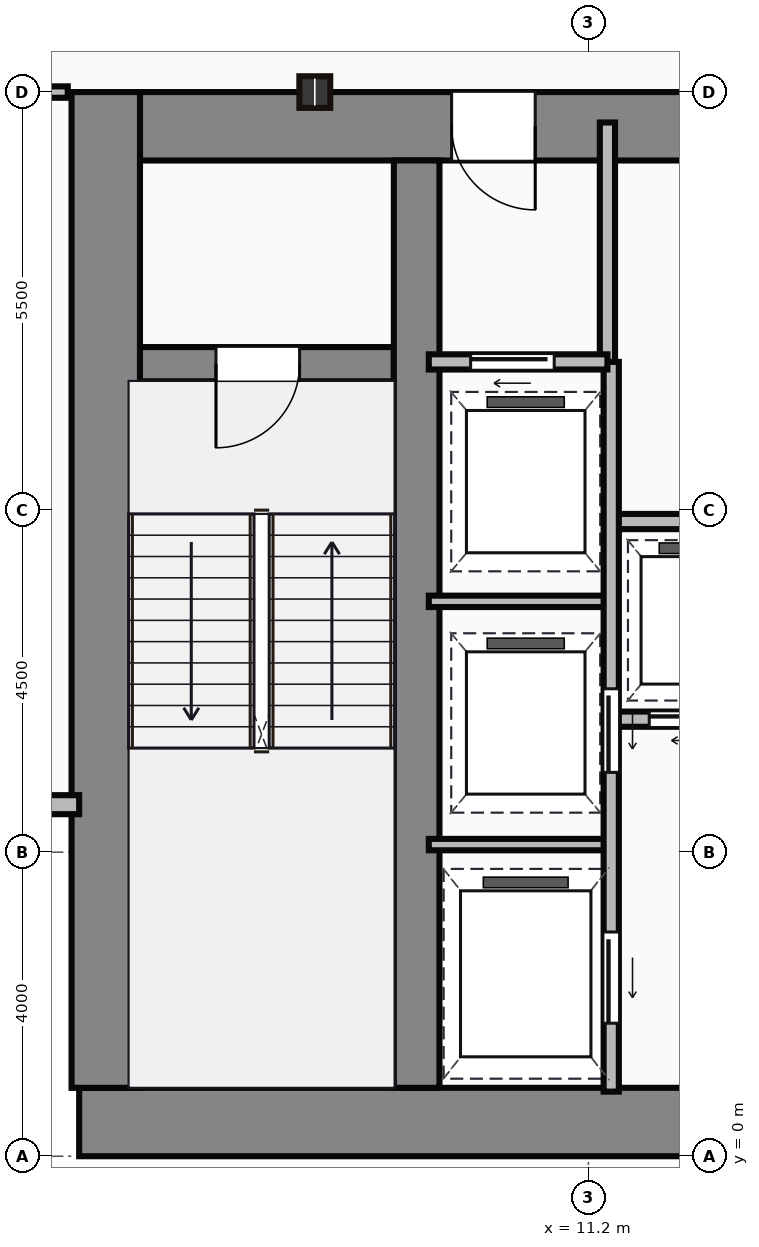
"""IFC4 building model, lengths in metres.
Left out: names, types, materials, properties, quantities, classifications, styles, units other than length and angle.
Written with IfcOpenShell. Run it as: python <this file> out.ifc"""

import sys

from ifc_helpers import new_model, si_unit, direction, frame, frame_2d, origin, origin_2d, place, context, subcontext, project, spatial, rectangle, i_section, extrude, source, transform, mapped, element, fill, save


model = new_model("IFC4")
c1 = context("Model", 3, precision=1e-05, world=origin(), true_north=direction((0.0, 1.0)))
c2 = subcontext(c1, "Body", "Model", "MODEL_VIEW")
j1 = project(units=[si_unit("LENGTHUNIT", "METRE"), si_unit("PLANEANGLEUNIT", "RADIAN")], contexts=[c1])
p1 = place(None, origin())
s1 = spatial("IfcSite", under=j1, at=p1, CompositionType="ELEMENT")
p2 = place(p1, origin())
s2 = spatial("IfcBuilding", under=s1, at=p2, CompositionType="ELEMENT")
p3 = place(p2, frame((0.0, 0.0, 79.95)))
s3 = spatial("IfcBuildingStorey", under=s2, at=p3, CompositionType="ELEMENT", Elevation=79.95)
m1 = source(origin(), c2, "Body", "SweptSolid", [
    extrude(rectangle(XDim=29.5, YDim=0.9, at=frame_2d((14.75, 0.0))), origin(), (0.0, 0.0, 1.0), 4.2),
])
p4 = place(p3, frame((4.5, 0.45, 0.0), z_axis=(0.0, 0.0, 1.0), x_axis=(1.0, 0.0, 0.0)))
e1 = element("IfcWall", 1, at=p4, inside=s3, PredefinedType="SHEAR", context=c2, shape_type="MappedRepresentation", body=[
    mapped(m1, transform((0.0, 0.0, 0.0))),
])
m2 = source(origin(), c2, "Body", "SweptSolid", [
    extrude(rectangle(XDim=13.1, YDim=0.9, at=frame_2d((6.55, 0.0))), origin(), (0.0, 0.0, 1.0), 4.2),
])
p5 = place(p3, frame((4.85, 0.9, 0.0), z_axis=(0.0, 0.0, 1.0), x_axis=(0.0, 1.0, 0.0)))
e2 = element("IfcWall", 2, at=p5, inside=s3, PredefinedType="SHEAR", context=c2, shape_type="MappedRepresentation", body=[
    mapped(m2, transform((0.0, 0.0, 0.0))),
])
m3 = source(origin(), c2, "Body", "SweptSolid", [
    extrude(rectangle(XDim=9.1, YDim=0.9, at=frame_2d((4.55, 0.0))), origin(), (0.0, 0.0, 1.0), 4.2),
])
p6 = place(p3, frame((5.3, 13.55, 0.0), z_axis=(0.0, 0.0, 1.0), x_axis=(1.0, 0.0, 0.0)))
e3 = element("IfcWall", 3, at=p6, inside=s3, PredefinedType="SHEAR", context=c2, shape_type="MappedRepresentation", body=[
    mapped(m3, transform((0.0, 0.0, 0.0))),
])
p7 = place(p6, frame((4.1, 0.0, 0.0)))
e4 = element("IfcOpeningElement", 4, at=p7, cuts=e3, PredefinedType="OPENING", context=c2, shape_type="SweptSolid", body=[
    extrude(rectangle(XDim=1.1, YDim=2.15, at=frame_2d((0.55, 1.075))), frame((0.0, 0.46, 0.0), z_axis=(0.0, -1.0, 0.0), x_axis=(1.0, 0.0, 0.0)), (0.0, 0.0, 1.0), 0.92),
])
m4 = source(origin(), c2, "Body", "SweptSolid", [
    extrude(rectangle(XDim=12.2, YDim=0.6, at=frame_2d((6.1, 0.0))), origin(), (0.0, 0.0, 1.0), 4.2),
])
p8 = place(p3, frame((8.94, 0.9, 0.0), z_axis=(0.0, 0.0, 1.0), x_axis=(0.0, 1.0, 0.0)))
e5 = element("IfcWall", 5, at=p8, inside=s3, PredefinedType="SHEAR", context=c2, shape_type="MappedRepresentation", body=[
    mapped(m4, transform((0.0, 0.0, 0.0))),
])
m5 = source(origin(), c2, "Body", "SweptSolid", [
    extrude(rectangle(XDim=3.39, YDim=0.45, at=frame_2d((1.695, 0.0))), origin(), (0.0, 0.0, 1.0), 4.2),
])
p9 = place(p3, frame((5.25, 10.42, 0.0), z_axis=(0.0, 0.0, 1.0), x_axis=(1.0, 0.0, 0.0)))
e6 = element("IfcWall", 6, at=p9, inside=s3, PredefinedType="SHEAR", context=c2, shape_type="MappedRepresentation", body=[
    mapped(m5, transform((0.0, 0.0, 0.0))),
])
p10 = place(p9, frame((1.05, 0.0, 0.0)))
e7 = element("IfcOpeningElement", 7, at=p10, cuts=e6, PredefinedType="OPENING", context=c2, shape_type="SweptSolid", body=[
    extrude(rectangle(XDim=1.1, YDim=2.15, at=frame_2d((0.55, 1.075))), frame((0.0, 0.235, 0.0), z_axis=(0.0, -1.0, 0.0), x_axis=(1.0, 0.0, 0.0)), (0.0, 0.0, 1.0), 0.47),
])
m6 = source(origin(), c2, "Body", "SweptSolid", [
    extrude(i_section(OverallWidth=0.406, OverallDepth=0.416, WebThickness=0.03, FlangeThickness=0.048, at=origin_2d()), origin(), (0.0, 0.0, 1.0), 4.2),
])
p11 = place(p3, frame((7.6, 14.0, 0.0), z_axis=(0.0, 0.0, 1.0), x_axis=(1.0, 0.0, 0.0)))
e8 = element("IfcColumn", 8, at=p11, inside=s3, PredefinedType="COLUMN", context=c2, shape_type="MappedRepresentation", body=[
    mapped(m6, transform((0.0, 0.0, 0.0))),
])
m7 = source(origin(), c2, "Body", "SweptSolid", [
    extrude(rectangle(XDim=4.5, YDim=0.25, at=frame_2d((2.25, 0.0))), origin(), (0.0, 0.0, 1.0), 3.9),
])
p12 = place(p3, frame((0.0, 4.625, 0.0), z_axis=(0.0, 0.0, 1.0), x_axis=(1.0, 0.0, 0.0)))
e9 = element("IfcWall", 9, at=p12, inside=s3, PredefinedType="STANDARD", context=c2, shape_type="MappedRepresentation", body=[
    mapped(m7, transform((0.0, 0.0, 0.0))),
])
m8 = source(origin(), c2, "Body", "SweptSolid", [
    extrude(rectangle(XDim=3.18, YDim=0.2, at=frame_2d((1.59, 0.0))), origin(), (0.0, 0.0, 1.0), 3.9),
])
p13 = place(p3, frame((11.45, 10.42, 0.0), z_axis=(0.0, 0.0, 1.0), x_axis=(0.0, 1.0, 0.0)))
e10 = element("IfcWall", 10, at=p13, inside=s3, PredefinedType="PARTITIONING", context=c2, shape_type="MappedRepresentation", body=[
    mapped(m8, transform((0.0, 0.0, 0.0))),
])
m9 = source(origin(), c2, "Body", "SweptSolid", [
    extrude(rectangle(XDim=2.35, YDim=0.2, at=frame_2d((1.175, 0.0))), origin(), (0.0, 0.0, 1.0), 3.9),
])
p14 = place(p3, frame((9.1, 10.45, 0.0), z_axis=(0.0, 0.0, 1.0), x_axis=(1.0, 0.0, 0.0)))
e11 = element("IfcWall", 11, at=p14, inside=s3, PredefinedType="PARTITIONING", context=c2, shape_type="MappedRepresentation", body=[
    mapped(m9, transform((0.0, 0.0, 0.0))),
])
p15 = place(p14, frame((0.55, 0.0, 0.0)))
e12 = element("IfcOpeningElement", 12, at=p15, cuts=e11, PredefinedType="OPENING", context=c2, shape_type="SweptSolid", body=[
    extrude(rectangle(XDim=1.1, YDim=2.15, at=frame_2d((0.55, 1.075))), frame((0.0, 0.11, 0.0), z_axis=(0.0, -1.0, 0.0), x_axis=(1.0, 0.0, 0.0)), (0.0, 0.0, 1.0), 0.22),
])
m10 = source(origin(), c2, "Body", "SweptSolid", [
    extrude(rectangle(XDim=9.6, YDim=0.2, at=frame_2d((4.8, 0.0))), origin(), (0.0, 0.0, 1.0), 3.9),
])
p16 = place(p3, frame((11.5, 0.85, 0.0), z_axis=(0.0, 0.0, 1.0), x_axis=(0.0, 1.0, 0.0)))
e13 = element("IfcWall", 13, at=p16, inside=s3, PredefinedType="PARTITIONING", context=c2, shape_type="MappedRepresentation", body=[
    mapped(m10, transform((0.0, 0.0, 0.0))),
])
p17 = place(p16, frame((4.2, 0.0, 0.0)))
e14 = element("IfcOpeningElement", 14, at=p17, cuts=e13, PredefinedType="OPENING", context=c2, shape_type="SweptSolid", body=[
    extrude(rectangle(XDim=1.1, YDim=2.15, at=frame_2d((0.55, 1.075))), frame((0.0, 0.11, 0.0), z_axis=(0.0, -1.0, 0.0), x_axis=(1.0, 0.0, 0.0)), (0.0, 0.0, 1.0), 0.22),
])
p18 = place(p16, frame((0.9, 0.0, 0.0)))
e15 = element("IfcOpeningElement", 15, at=p18, cuts=e13, PredefinedType="OPENING", context=c2, shape_type="SweptSolid", body=[
    extrude(rectangle(XDim=1.2, YDim=2.15, at=frame_2d((0.6, 1.075))), frame((0.0, 0.11, 0.0), z_axis=(0.0, -1.0, 0.0), x_axis=(1.0, 0.0, 0.0)), (0.0, 0.0, 1.0), 0.22),
])
m11 = source(origin(), c2, "Body", "SweptSolid", [
    extrude(rectangle(XDim=2.4, YDim=0.15, at=frame_2d((1.2, 0.0))), origin(), (0.0, 0.0, 1.0), 3.9),
])
for number, where, z_axis, x_axis in (
    (16, (9.1, 4.1, 0.0), (0.0, 0.0, 1.0), (1.0, 0.0, 0.0)),
    (17, (9.1, 7.3, 0.0), (0.0, 0.0, 1.0), (1.0, 0.0, 0.0)),
):
    element("IfcWall", number, at=place(p3, frame(where, z_axis=z_axis, x_axis=x_axis)), inside=s3, PredefinedType="PARTITIONING", context=c2, shape_type="MappedRepresentation", body=[
        mapped(m11, transform((0.0, 0.0, 0.0))),
    ])
m12 = source(origin(), c2, "Body", "SweptSolid", [
    extrude(rectangle(XDim=11.85, YDim=0.2, at=frame_2d((5.925, 0.0))), origin(), (0.0, 0.0, 1.0), 3.9),
])
p19 = place(p3, frame((11.55, 5.75, 0.0), z_axis=(0.0, 0.0, 1.0), x_axis=(1.0, 0.0, 0.0)))
e18 = element("IfcWall", 18, at=p19, inside=s3, PredefinedType="PARTITIONING", context=c2, shape_type="MappedRepresentation", body=[
    mapped(m12, transform((0.0, 0.0, 0.0))),
])
p20 = place(p19, frame((0.45, 0.0, 0.0)))
e19 = element("IfcOpeningElement", 19, at=p20, cuts=e18, PredefinedType="OPENING", context=c2, shape_type="SweptSolid", body=[
    extrude(rectangle(XDim=1.05, YDim=2.15, at=frame_2d((0.525, 1.075))), frame((0.0, 0.11, 0.0), z_axis=(0.0, -1.0, 0.0), x_axis=(1.0, 0.0, 0.0)), (0.0, 0.0, 1.0), 0.22),
])
p21 = place(p19, frame((2.4, 0.0, 0.0)))
e20 = element("IfcOpeningElement", 20, at=p21, cuts=e18, PredefinedType="OPENING", context=c2, shape_type="SweptSolid", body=[
    extrude(rectangle(XDim=1.05, YDim=2.15, at=frame_2d((0.525, 1.075))), frame((0.0, 0.11, 0.0), z_axis=(0.0, -1.0, 0.0), x_axis=(1.0, 0.0, 0.0)), (0.0, 0.0, 1.0), 0.22),
])
p22 = place(p19, frame((4.35, 0.0, 0.0)))
e21 = element("IfcOpeningElement", 21, at=p22, cuts=e18, PredefinedType="OPENING", context=c2, shape_type="SweptSolid", body=[
    extrude(rectangle(XDim=1.05, YDim=2.15, at=frame_2d((0.525, 1.075))), frame((0.0, 0.11, 0.0), z_axis=(0.0, -1.0, 0.0), x_axis=(1.0, 0.0, 0.0)), (0.0, 0.0, 1.0), 0.22),
])
p23 = place(p19, frame((6.3, 0.0, 0.0)))
e22 = element("IfcOpeningElement", 22, at=p23, cuts=e18, PredefinedType="OPENING", context=c2, shape_type="SweptSolid", body=[
    extrude(rectangle(XDim=1.05, YDim=2.15, at=frame_2d((0.525, 1.075))), frame((0.0, 0.11, 0.0), z_axis=(0.0, -1.0, 0.0), x_axis=(1.0, 0.0, 0.0)), (0.0, 0.0, 1.0), 0.22),
])
p24 = place(p19, frame((8.25, 0.0, 0.0)))
e23 = element("IfcOpeningElement", 23, at=p24, cuts=e18, PredefinedType="OPENING", context=c2, shape_type="SweptSolid", body=[
    extrude(rectangle(XDim=1.05, YDim=2.15, at=frame_2d((0.525, 1.075))), frame((0.0, 0.11, 0.0), z_axis=(0.0, -1.0, 0.0), x_axis=(1.0, 0.0, 0.0)), (0.0, 0.0, 1.0), 0.22),
])
p25 = place(p19, frame((10.2, 0.0, 0.0)))
e24 = element("IfcOpeningElement", 24, at=p25, cuts=e18, PredefinedType="OPENING", context=c2, shape_type="SweptSolid", body=[
    extrude(rectangle(XDim=1.05, YDim=2.15, at=frame_2d((0.525, 1.075))), frame((0.0, 0.11, 0.0), z_axis=(0.0, -1.0, 0.0), x_axis=(1.0, 0.0, 0.0)), (0.0, 0.0, 1.0), 0.22),
])
p26 = place(p3, frame((11.55, 8.35, 0.0), z_axis=(0.0, 0.0, 1.0), x_axis=(1.0, 0.0, 0.0)))
e25 = element("IfcWall", 25, at=p26, inside=s3, PredefinedType="PARTITIONING", context=c2, shape_type="MappedRepresentation", body=[
    mapped(m12, transform((0.0, 0.0, 0.0))),
])
m13 = source(origin(), c2, "Body", "SweptSolid", [
    extrude(rectangle(XDim=0.95, YDim=0.15, at=frame_2d((0.475, 0.0))), origin(), (0.0, 0.0, 1.0), 3.125),
])
p27 = place(p3, frame((4.35, 14.0, 0.0), z_axis=(0.0, 0.0, 1.0), x_axis=(-1.0, 0.0, 0.0)))
e26 = element("IfcWall", 26, at=p27, inside=s3, PredefinedType="PARTITIONING", context=c2, shape_type="MappedRepresentation", body=[
    mapped(m13, transform((0.0, 0.0, 0.0))),
])
m14 = source(origin(), c2, "Body", "SweptSolid", [
    extrude(rectangle(XDim=1.1, YDim=2.15, at=frame_2d((0.55, 1.075))), frame((0.0, 0.025, 0.0), z_axis=(0.0, -1.0, 0.0), x_axis=(1.0, 0.0, 0.0)), (0.0, 0.0, 1.0), 0.05),
])
p28 = place(p10, frame((1.1, 0.0, 0.0), z_axis=(0.0, 0.0, 1.0), x_axis=(-1.0, 0.0, 0.0)))
e27 = element("IfcDoor", 27, at=p28, inside=s3, OperationType="SINGLE_SWING_LEFT", PredefinedType="DOOR", context=c2, shape_type="MappedRepresentation", body=[
    mapped(m14, transform((0.0, 0.0, 0.0))),
])
fill(e7, e27)
p29 = place(p7, origin())
e28 = element("IfcDoor", 28, at=p29, inside=s3, OperationType="SINGLE_SWING_RIGHT", PredefinedType="DOOR", context=c2, shape_type="MappedRepresentation", body=[
    mapped(m14, transform((0.0, 0.0, 0.0))),
])
fill(e4, e28)
p30 = place(p15, origin())
e29 = element("IfcDoor", 29, at=p30, inside=s3, OperationType="SLIDING_TO_LEFT", PredefinedType="DOOR", context=c2, shape_type="MappedRepresentation", body=[
    mapped(m14, transform((0.0, 0.0, 0.0))),
])
fill(e12, e29)
p31 = place(p17, frame((1.1, 0.0, 0.0), z_axis=(0.0, 0.0, 1.0), x_axis=(-1.0, 0.0, 0.0)))
e30 = element("IfcDoor", 30, at=p31, inside=s3, OperationType="SLIDING_TO_LEFT", PredefinedType="DOOR", context=c2, shape_type="MappedRepresentation", body=[
    mapped(m14, transform((0.0, 0.0, 0.0))),
])
fill(e14, e30)
m15 = source(origin(), c2, "Body", "SweptSolid", [
    extrude(rectangle(XDim=1.2, YDim=2.15, at=frame_2d((0.6, 1.075))), frame((0.0, 0.025, 0.0), z_axis=(0.0, -1.0, 0.0), x_axis=(1.0, 0.0, 0.0)), (0.0, 0.0, 1.0), 0.05),
])
p32 = place(p18, frame((1.2, 0.0, 0.0), z_axis=(0.0, 0.0, 1.0), x_axis=(-1.0, 0.0, 0.0)))
e31 = element("IfcDoor", 31, at=p32, inside=s3, OperationType="SLIDING_TO_LEFT", PredefinedType="DOOR", context=c2, shape_type="MappedRepresentation", body=[
    mapped(m15, transform((0.0, 0.0, 0.0))),
])
fill(e15, e31)
m16 = source(origin(), c2, "Body", "SweptSolid", [
    extrude(rectangle(XDim=1.05, YDim=2.15, at=frame_2d((0.525, 1.075))), frame((0.0, 0.025, 0.0), z_axis=(0.0, -1.0, 0.0), x_axis=(1.0, 0.0, 0.0)), (0.0, 0.0, 1.0), 0.05),
])
p33 = place(p20, frame((1.05, 0.0, 0.0), z_axis=(0.0, 0.0, 1.0), x_axis=(-1.0, 0.0, 0.0)))
e32 = element("IfcDoor", 32, at=p33, inside=s3, OperationType="SLIDING_TO_LEFT", PredefinedType="DOOR", context=c2, shape_type="MappedRepresentation", body=[
    mapped(m16, transform((0.0, 0.0, 0.0))),
])
fill(e19, e32)
save(model, sys.argv[1])
